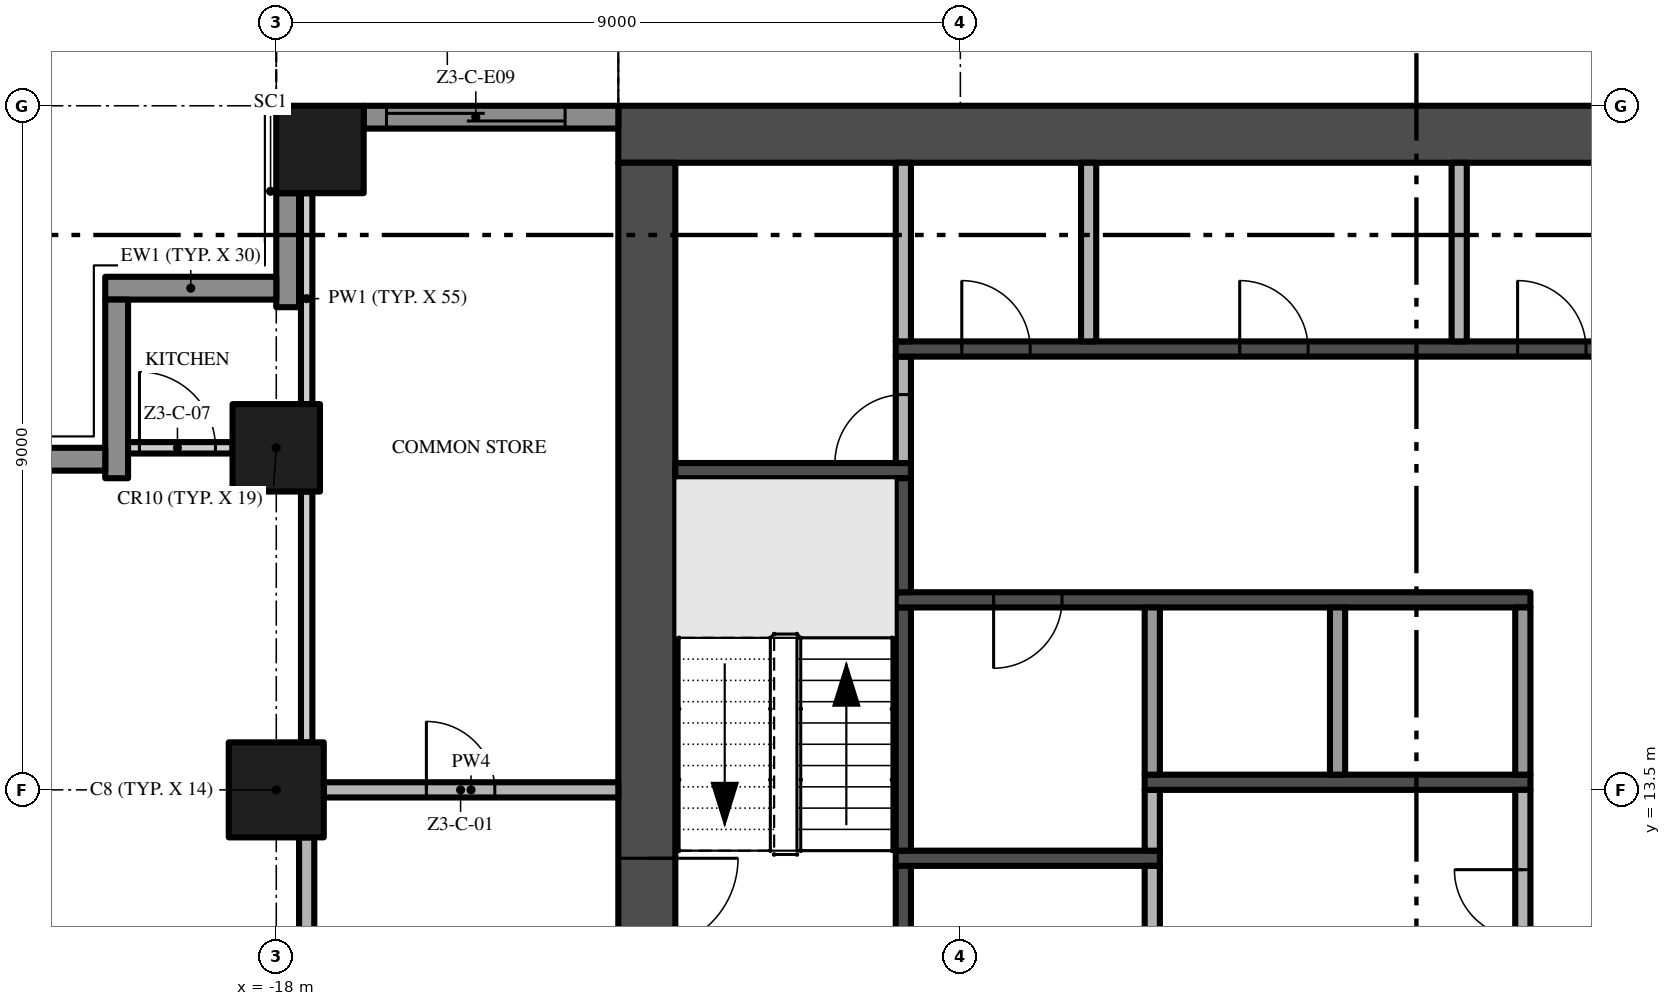
"""IFC4 building model, lengths in metres.
Left out: names, types, materials, properties, quantities, classifications, styles, units other than length and angle.
Written with IfcOpenShell. Run it as: python <this file> out.ifc"""

import sys

from ifc_helpers import new_model, si_unit, direction, frame, frame_2d, origin, origin_2d, place, context, subcontext, project, spatial, rectangle, extrude, element, fill, save


model = new_model("IFC4")
c1 = context("Model", 3, precision=1e-05, world=origin(), true_north=direction((0.0, 1.0)))
c2 = subcontext(c1, "Body", "Model", "MODEL_VIEW")
j1 = project(units=[si_unit("LENGTHUNIT", "METRE"), si_unit("PLANEANGLEUNIT", "RADIAN")], contexts=[c1])
p1 = place(None, origin())
s1 = spatial("IfcSite", under=j1, at=p1, CompositionType="ELEMENT")
p2 = place(p1, origin())
s2 = spatial("IfcBuilding", under=s1, at=p2, CompositionType="ELEMENT")
p3 = place(p2, frame((0.0, 0.0, 147.8)))
s3 = spatial("IfcBuildingStorey", under=s2, at=p3, CompositionType="ELEMENT", Elevation=147.8)
p4 = place(p3, frame((13.5, 22.125, -0.3), z_axis=(0.0, 0.0, 1.0), x_axis=(-1.0, 0.0, 0.0)))
e1 = element("IfcWall", 1, at=p4, inside=s3, PredefinedType="SHEAR", context=c2, shape_type="SweptSolid", body=[
    extrude(rectangle(XDim=27.0, YDim=0.75, at=frame_2d((13.5, 0.0))), origin(), (0.0, 0.0, 1.0), 3.8),
])
p5 = place(p3, frame((-13.125, 21.75, -0.3), z_axis=(0.0, 0.0, 1.0), x_axis=(0.0, -1.0, 0.0)))
e2 = element("IfcWall", 2, at=p5, inside=s3, PredefinedType="SHEAR", context=c2, shape_type="SweptSolid", body=[
    extrude(rectangle(XDim=16.5, YDim=0.75, at=frame_2d((8.25, 0.0))), origin(), (0.0, 0.0, 1.0), 3.8),
])
p6 = place(p5, frame((9.15, 0.0, 0.3)))
e3 = element("IfcOpeningElement", 3, at=p6, cuts=e2, PredefinedType="OPENING", context=c2, shape_type="SweptSolid", body=[
    extrude(rectangle(XDim=1.2, YDim=2.2, at=frame_2d((0.6, 1.1))), frame((0.0, 0.385, 0.0), z_axis=(0.0, -1.0, 0.0), x_axis=(1.0, 0.0, 0.0)), (0.0, 0.0, 1.0), 0.77),
])
p7 = place(p3, frame((-18.0, 13.5, 0.0), z_axis=(0.0, 0.0, 1.0), x_axis=(1.0, 0.0, 0.0)))
e4 = element("IfcColumn", 4, at=p7, inside=s3, PredefinedType="COLUMN", context=c2, shape_type="SweptSolid", body=[
    extrude(rectangle(XDim=1.25, YDim=1.25, at=origin_2d()), origin(), (0.0, 0.0, 1.0), 3.5),
])
for number, where, z_axis, x_axis in (
    (5, (-17.425, 21.925, 0.0), (0.0, 0.0, 1.0), (1.0, 0.0, 0.0)),
    (6, (-18.0, 18.0, 0.0), (0.0, 0.0, 1.0), (1.0, 0.0, 0.0)),
):
    element("IfcColumn", number, at=place(p3, frame(where, z_axis=z_axis, x_axis=x_axis)), inside=s3, PredefinedType="COLUMN", context=c2, shape_type="SweptSolid", body=[
        extrude(rectangle(XDim=1.15, YDim=1.15, at=origin_2d()), origin(), (0.0, 0.0, 1.0), 3.5),
    ])
p8 = place(p3, frame((-16.85, 22.35, 0.0), z_axis=(0.0, 0.0, 1.0), x_axis=(1.0, 0.0, 0.0)))
e7 = element("IfcWall", 7, at=p8, inside=s3, PredefinedType="SOLIDWALL", context=c2, shape_type="SweptSolid", body=[
    extrude(rectangle(XDim=3.35, YDim=0.3, at=frame_2d((1.675, 0.0))), origin(), (0.0, 0.0, 1.0), 3.5),
])
p9 = place(p8, frame((0.3, 0.0, 0.0)))
e8 = element("IfcOpeningElement", 8, at=p9, cuts=e7, PredefinedType="OPENING", context=c2, shape_type="SweptSolid", body=[
    extrude(rectangle(XDim=2.35, YDim=2.4, at=frame_2d((1.175, 1.2))), frame((0.0, 0.16, 0.0), z_axis=(0.0, -1.0, 0.0), x_axis=(1.0, 0.0, 0.0)), (0.0, 0.0, 1.0), 0.32),
])
p10 = place(p3, frame((-17.85, 19.85, 0.0), z_axis=(0.0, 0.0, 1.0), x_axis=(0.0, 1.0, 0.0)))
e9 = element("IfcWall", 9, at=p10, inside=s3, PredefinedType="SOLIDWALL", context=c2, shape_type="SweptSolid", body=[
    extrude(rectangle(XDim=1.5, YDim=0.3, at=frame_2d((0.75, 0.0))), origin(), (0.0, 0.0, 1.0), 3.5),
])
p11 = place(p3, frame((-20.25, 20.1, 0.0), z_axis=(0.0, 0.0, 1.0), x_axis=(1.0, 0.0, 0.0)))
e10 = element("IfcWall", 10, at=p11, inside=s3, PredefinedType="SOLIDWALL", context=c2, shape_type="SweptSolid", body=[
    extrude(rectangle(XDim=2.25, YDim=0.3, at=frame_2d((1.125, 0.0))), origin(), (0.0, 0.0, 1.0), 3.5),
])
p12 = place(p3, frame((-20.1, 17.6, 0.0), z_axis=(0.0, 0.0, 1.0), x_axis=(0.0, 1.0, 0.0)))
e11 = element("IfcWall", 11, at=p12, inside=s3, PredefinedType="SOLIDWALL", context=c2, shape_type="SweptSolid", body=[
    extrude(rectangle(XDim=2.35, YDim=0.3, at=frame_2d((1.175, 0.0))), origin(), (0.0, 0.0, 1.0), 3.5),
])
p13 = place(p3, frame((-22.5, 17.85, 0.0), z_axis=(0.0, 0.0, 1.0), x_axis=(1.0, 0.0, 0.0)))
e12 = element("IfcWall", 12, at=p13, inside=s3, PredefinedType="SOLIDWALL", context=c2, shape_type="SweptSolid", body=[
    extrude(rectangle(XDim=2.25, YDim=0.3, at=frame_2d((1.125, 0.0))), origin(), (0.0, 0.0, 1.0), 3.5),
])
p14 = place(p3, frame((-12.75, 17.7, 0.0), z_axis=(0.0, 0.0, 1.0), x_axis=(1.0, 0.0, 0.0)))
e13 = element("IfcWall", 13, at=p14, inside=s3, PredefinedType="SHEAR", context=c2, shape_type="SweptSolid", body=[
    extrude(rectangle(XDim=3.1, YDim=0.2, at=frame_2d((1.55, 0.0))), origin(), (0.0, 0.0, 1.0), 3.5),
])
p15 = place(p3, frame((-9.75, 10.2, 0.0), z_axis=(0.0, 0.0, 1.0), x_axis=(0.0, 1.0, 0.0)))
e14 = element("IfcWall", 14, at=p15, inside=s3, PredefinedType="SHEAR", context=c2, shape_type="SweptSolid", body=[
    extrude(rectangle(XDim=2.3, YDim=0.2, at=frame_2d((1.15, 0.0))), origin(), (0.0, 0.0, 1.0), 3.5),
])
p16 = place(p3, frame((-9.85, 12.6, 0.0), z_axis=(0.0, 0.0, 1.0), x_axis=(1.0, 0.0, 0.0)))
e15 = element("IfcWall", 15, at=p16, inside=s3, PredefinedType="SHEAR", context=c2, shape_type="SweptSolid", body=[
    extrude(rectangle(XDim=3.475, YDim=0.2, at=frame_2d((1.738, 0.0))), origin(), (0.0, 0.0, 1.0), 3.5),
])
p17 = place(p3, frame((-9.75, 12.7, 0.0), z_axis=(0.0, 0.0, 1.0), x_axis=(0.0, 1.0, 0.0)))
e16 = element("IfcWall", 16, at=p17, inside=s3, PredefinedType="SHEAR", context=c2, shape_type="SweptSolid", body=[
    extrude(rectangle(XDim=3.2, YDim=0.2, at=frame_2d((1.6, 0.0))), origin(), (0.0, 0.0, 1.0), 3.5),
])
p18 = place(p3, frame((-1.5, 16.0, 0.0), z_axis=(0.0, 0.0, 1.0), x_axis=(-1.0, 0.0, 0.0)))
e17 = element("IfcWall", 17, at=p18, inside=s3, PredefinedType="SHEAR", context=c2, shape_type="SweptSolid", body=[
    extrude(rectangle(XDim=8.35, YDim=0.2, at=frame_2d((4.175, 0.0))), origin(), (0.0, 0.0, 1.0), 3.5),
])
p19 = place(p18, frame((6.162, 0.0, 0.0)))
e18 = element("IfcOpeningElement", 18, at=p19, cuts=e17, PredefinedType="OPENING", context=c2, shape_type="SweptSolid", body=[
    extrude(rectangle(XDim=0.9, YDim=2.1, at=frame_2d((0.45, 1.05))), frame((0.0, 0.11, 0.0), z_axis=(0.0, -1.0, 0.0), x_axis=(1.0, 0.0, 0.0)), (0.0, 0.0, 1.0), 0.22),
])
p20 = place(p3, frame((-9.75, 16.1, 0.0), z_axis=(0.0, 0.0, 1.0), x_axis=(0.0, 1.0, 0.0)))
e19 = element("IfcWall", 19, at=p20, inside=s3, PredefinedType="SHEAR", context=c2, shape_type="SweptSolid", body=[
    extrude(rectangle(XDim=1.5, YDim=0.2, at=frame_2d((0.75, 0.0))), origin(), (0.0, 0.0, 1.0), 3.5),
])
p21 = place(p3, frame((-9.75, 17.8, 0.0), z_axis=(0.0, 0.0, 1.0), x_axis=(0.0, 1.0, 0.0)))
e20 = element("IfcWall", 20, at=p21, inside=s3, PredefinedType="PARTITIONING", context=c2, shape_type="SweptSolid", body=[
    extrude(rectangle(XDim=1.4, YDim=0.2, at=frame_2d((0.7, 0.0))), origin(), (0.0, 0.0, 1.0), 3.5),
])
p22 = place(p21, origin())
e21 = element("IfcOpeningElement", 21, at=p22, cuts=e20, PredefinedType="OPENING", context=c2, shape_type="SweptSolid", body=[
    extrude(rectangle(XDim=0.9, YDim=2.1, at=frame_2d((0.45, 1.05))), frame((0.0, 0.11, 0.0), z_axis=(0.0, -1.0, 0.0), x_axis=(1.0, 0.0, 0.0)), (0.0, 0.0, 1.0), 0.22),
])
p23 = place(p3, frame((-9.85, 19.3, 0.0), z_axis=(0.0, 0.0, 1.0), x_axis=(1.0, 0.0, 0.0)))
e22 = element("IfcWall", 22, at=p23, inside=s3, PredefinedType="SHEAR", context=c2, shape_type="SweptSolid", body=[
    extrude(rectangle(XDim=19.7, YDim=0.2, at=frame_2d((9.85, 0.0))), origin(), (0.0, 0.0, 1.0), 3.5),
])
p24 = place(p23, frame((10.519, 0.0, 0.0)))
e23 = element("IfcOpeningElement", 23, at=p24, cuts=e22, PredefinedType="OPENING", context=c2, shape_type="SweptSolid", body=[
    extrude(rectangle(XDim=1.1, YDim=2.1, at=frame_2d((0.55, 1.05))), frame((0.0, 0.11, 0.0), z_axis=(0.0, -1.0, 0.0), x_axis=(1.0, 0.0, 0.0)), (0.0, 0.0, 1.0), 0.22),
])
p25 = place(p23, frame((12.956, 0.0, 0.0)))
e24 = element("IfcOpeningElement", 24, at=p25, cuts=e22, PredefinedType="OPENING", context=c2, shape_type="SweptSolid", body=[
    extrude(rectangle(XDim=1.1, YDim=2.1, at=frame_2d((0.55, 1.05))), frame((0.0, 0.11, 0.0), z_axis=(0.0, -1.0, 0.0), x_axis=(1.0, 0.0, 0.0)), (0.0, 0.0, 1.0), 0.22),
])
p26 = place(p23, frame((15.394, 0.0, 0.0)))
e25 = element("IfcOpeningElement", 25, at=p26, cuts=e22, PredefinedType="OPENING", context=c2, shape_type="SweptSolid", body=[
    extrude(rectangle(XDim=1.1, YDim=2.1, at=frame_2d((0.55, 1.05))), frame((0.0, 0.11, 0.0), z_axis=(0.0, -1.0, 0.0), x_axis=(1.0, 0.0, 0.0)), (0.0, 0.0, 1.0), 0.22),
])
p27 = place(p23, frame((17.831, 0.0, 0.0)))
e26 = element("IfcOpeningElement", 26, at=p27, cuts=e22, PredefinedType="OPENING", context=c2, shape_type="SweptSolid", body=[
    extrude(rectangle(XDim=1.1, YDim=2.1, at=frame_2d((0.55, 1.05))), frame((0.0, 0.11, 0.0), z_axis=(0.0, -1.0, 0.0), x_axis=(1.0, 0.0, 0.0)), (0.0, 0.0, 1.0), 0.22),
])
p28 = place(p23, frame((0.869, 0.0, 0.0)))
e27 = element("IfcOpeningElement", 27, at=p28, cuts=e22, PredefinedType="OPENING", context=c2, shape_type="SweptSolid", body=[
    extrude(rectangle(XDim=0.9, YDim=2.1, at=frame_2d((0.45, 1.05))), frame((0.0, 0.11, 0.0), z_axis=(0.0, -1.0, 0.0), x_axis=(1.0, 0.0, 0.0)), (0.0, 0.0, 1.0), 0.22),
])
p29 = place(p23, frame((4.525, 0.0, 0.0)))
e28 = element("IfcOpeningElement", 28, at=p29, cuts=e22, PredefinedType="OPENING", context=c2, shape_type="SweptSolid", body=[
    extrude(rectangle(XDim=0.9, YDim=2.1, at=frame_2d((0.45, 1.05))), frame((0.0, 0.11, 0.0), z_axis=(0.0, -1.0, 0.0), x_axis=(1.0, 0.0, 0.0)), (0.0, 0.0, 1.0), 0.22),
])
p30 = place(p23, frame((8.181, 0.0, 0.0)))
e29 = element("IfcOpeningElement", 29, at=p30, cuts=e22, PredefinedType="OPENING", context=c2, shape_type="SweptSolid", body=[
    extrude(rectangle(XDim=0.9, YDim=2.1, at=frame_2d((0.45, 1.05))), frame((0.0, 0.11, 0.0), z_axis=(0.0, -1.0, 0.0), x_axis=(1.0, 0.0, 0.0)), (0.0, 0.0, 1.0), 0.22),
])
for number, where, z_axis, x_axis in (
    (30, (-9.75, 19.4, 0.0), (0.0, 0.0, 1.0), (0.0, 1.0, 0.0)),
    (31, (-7.312, 19.4, 0.0), (0.0, 0.0, 1.0), (0.0, 1.0, 0.0)),
):
    element("IfcWall", number, at=place(p3, frame(where, z_axis=z_axis, x_axis=x_axis)), inside=s3, PredefinedType="PARTITIONING", context=c2, shape_type="SweptSolid", body=[
        extrude(rectangle(XDim=2.35, YDim=0.2, at=frame_2d((1.175, 0.0))), origin(), (0.0, 0.0, 1.0), 3.5),
    ])
p31 = place(p3, frame((-6.475, 10.5, 0.0), z_axis=(0.0, 0.0, 1.0), x_axis=(0.0, 1.0, 0.0)))
e32 = element("IfcWall", 32, at=p31, inside=s3, PredefinedType="PARTITIONING", context=c2, shape_type="SweptSolid", body=[
    extrude(rectangle(XDim=2.0, YDim=0.2, at=frame_2d((1.0, 0.0))), origin(), (0.0, 0.0, 1.0), 3.5),
])
p32 = place(p3, frame((-6.475, 12.7, 0.0), z_axis=(0.0, 0.0, 1.0), x_axis=(0.0, 1.0, 0.0)))
e33 = element("IfcWall", 33, at=p32, inside=s3, PredefinedType="PARTITIONING", context=c2, shape_type="SweptSolid", body=[
    extrude(rectangle(XDim=0.8, YDim=0.2, at=frame_2d((0.4, 0.0))), origin(), (0.0, 0.0, 1.0), 3.5),
])
p33 = place(p3, frame((-6.575, 13.6, 0.0), z_axis=(0.0, 0.0, 1.0), x_axis=(1.0, 0.0, 0.0)))
e34 = element("IfcWall", 34, at=p33, inside=s3, PredefinedType="SHEAR", context=c2, shape_type="SweptSolid", body=[
    extrude(rectangle(XDim=5.075, YDim=0.2, at=frame_2d((2.538, 0.0))), origin(), (0.0, 0.0, 1.0), 3.5),
])
for number, where, z_axis, x_axis in (
    (35, (-6.475, 13.7, 0.0), (0.0, 0.0, 1.0), (0.0, 1.0, 0.0)),
    (36, (-4.037, 13.7, 0.0), (0.0, 0.0, 1.0), (0.0, 1.0, 0.0)),
):
    element("IfcWall", number, at=place(p3, frame(where, z_axis=z_axis, x_axis=x_axis)), inside=s3, PredefinedType="PARTITIONING", context=c2, shape_type="SweptSolid", body=[
        extrude(rectangle(XDim=2.2, YDim=0.2, at=frame_2d((1.1, 0.0))), origin(), (0.0, 0.0, 1.0), 3.5),
    ])
p34 = place(p3, frame((-2.438, 19.4, 0.0), z_axis=(0.0, 0.0, 1.0), x_axis=(0.0, 1.0, 0.0)))
e37 = element("IfcWall", 37, at=p34, inside=s3, PredefinedType="PARTITIONING", context=c2, shape_type="SweptSolid", body=[
    extrude(rectangle(XDim=2.35, YDim=0.2, at=frame_2d((1.175, 0.0))), origin(), (0.0, 0.0, 1.0), 3.5),
])
p35 = place(p3, frame((-1.6, 10.5, 0.0), z_axis=(0.0, 0.0, 1.0), x_axis=(0.0, 1.0, 0.0)))
e38 = element("IfcWall", 38, at=p35, inside=s3, PredefinedType="PARTITIONING", context=c2, shape_type="SweptSolid", body=[
    extrude(rectangle(XDim=3.0, YDim=0.2, at=frame_2d((1.5, 0.0))), origin(), (0.0, 0.0, 1.0), 3.5),
])
p36 = place(p35, frame((1.05, 0.0, 0.0)))
e39 = element("IfcOpeningElement", 39, at=p36, cuts=e38, PredefinedType="OPENING", context=c2, shape_type="SweptSolid", body=[
    extrude(rectangle(XDim=0.9, YDim=2.1, at=frame_2d((0.45, 1.05))), frame((0.0, 0.11, 0.0), z_axis=(0.0, -1.0, 0.0), x_axis=(1.0, 0.0, 0.0)), (0.0, 0.0, 1.0), 0.22),
])
p37 = place(p3, frame((-1.6, 13.7, 0.0), z_axis=(0.0, 0.0, 1.0), x_axis=(0.0, 1.0, 0.0)))
e40 = element("IfcWall", 40, at=p37, inside=s3, PredefinedType="PARTITIONING", context=c2, shape_type="SweptSolid", body=[
    extrude(rectangle(XDim=2.2, YDim=0.2, at=frame_2d((1.1, 0.0))), origin(), (0.0, 0.0, 1.0), 3.5),
])
p38 = place(p3, frame((-17.375, 13.5, 0.0), z_axis=(0.0, 0.0, 1.0), x_axis=(1.0, 0.0, 0.0)))
e41 = element("IfcWall", 41, at=p38, inside=s3, PredefinedType="PARTITIONING", context=c2, shape_type="SweptSolid", body=[
    extrude(rectangle(XDim=3.875, YDim=0.2, at=frame_2d((1.938, 0.0))), origin(), (0.0, 0.0, 1.0), 3.5),
])
p39 = place(p38, frame((1.35, 0.0, 0.0)))
e42 = element("IfcOpeningElement", 42, at=p39, cuts=e41, PredefinedType="OPENING", context=c2, shape_type="SweptSolid", body=[
    extrude(rectangle(XDim=0.9, YDim=2.1, at=frame_2d((0.45, 1.05))), frame((0.0, 0.11, 0.0), z_axis=(0.0, -1.0, 0.0), x_axis=(1.0, 0.0, 0.0)), (0.0, 0.0, 1.0), 0.22),
])
p40 = place(p3, frame((-19.95, 18.0, 0.0), z_axis=(0.0, 0.0, 1.0), x_axis=(1.0, 0.0, 0.0)))
e43 = element("IfcWall", 43, at=p40, inside=s3, PredefinedType="PARTITIONING", context=c2, shape_type="SweptSolid", body=[
    extrude(rectangle(XDim=1.375, YDim=0.15, at=frame_2d((0.688, 0.0))), origin(), (0.0, 0.0, 1.0), 3.5),
])
p41 = place(p40, frame((0.15, 0.0, 0.0)))
e44 = element("IfcOpeningElement", 44, at=p41, cuts=e43, PredefinedType="OPENING", context=c2, shape_type="SweptSolid", body=[
    extrude(rectangle(XDim=1.0, YDim=2.4, at=frame_2d((0.5, 1.2))), frame((0.0, 0.085, 0.0), z_axis=(0.0, -1.0, 0.0), x_axis=(1.0, 0.0, 0.0)), (0.0, 0.0, 1.0), 0.17),
])
p42 = place(p3, frame((-17.6, 5.125, 0.0), z_axis=(0.0, 0.0, 1.0), x_axis=(0.0, 1.0, 0.0)))
e45 = element("IfcWall", 45, at=p42, inside=s3, PredefinedType="PARTITIONING", context=c2, shape_type="SweptSolid", body=[
    extrude(rectangle(XDim=7.75, YDim=0.2, at=frame_2d((3.875, 0.0))), origin(), (0.0, 0.0, 1.0), 3.5),
])
p43 = place(p42, frame((1.0, 0.0, 0.0)))
e46 = element("IfcOpeningElement", 46, at=p43, cuts=e45, PredefinedType="OPENING", context=c2, shape_type="SweptSolid", body=[
    extrude(rectangle(XDim=1.2, YDim=2.4, at=frame_2d((0.6, 1.2))), frame((0.0, 0.11, 0.0), z_axis=(0.0, -1.0, 0.0), x_axis=(1.0, 0.0, 0.0)), (0.0, 0.0, 1.0), 0.22),
])
p44 = place(p3, frame((-17.6, 14.125, 0.0), z_axis=(0.0, 0.0, 1.0), x_axis=(0.0, 1.0, 0.0)))
e47 = element("IfcWall", 47, at=p44, inside=s3, PredefinedType="PARTITIONING", context=c2, shape_type="SweptSolid", body=[
    extrude(rectangle(XDim=3.3, YDim=0.15, at=frame_2d((1.65, 0.0))), origin(), (0.0, 0.0, 1.0), 3.5),
])
p45 = place(p3, frame((-17.6, 18.575, 0.0), z_axis=(0.0, 0.0, 1.0), x_axis=(0.0, 1.0, 0.0)))
e48 = element("IfcWall", 48, at=p45, inside=s3, PredefinedType="PARTITIONING", context=c2, shape_type="SweptSolid", body=[
    extrude(rectangle(XDim=2.775, YDim=0.15, at=frame_2d((1.387, 0.0))), origin(), (0.0, 0.0, 1.0), 3.5),
])
p46 = place(p9, origin())
e49 = element("IfcDoor", 49, at=p46, inside=s3, OperationType="SINGLE_SWING_LEFT", PredefinedType="DOOR", context=c2, shape_type="SweptSolid", body=[
    extrude(rectangle(XDim=2.35, YDim=2.4, at=frame_2d((1.175, 1.2))), frame((0.0, 0.025, 0.0), z_axis=(0.0, -1.0, 0.0), x_axis=(1.0, 0.0, 0.0)), (0.0, 0.0, 1.0), 0.05),
])
fill(e8, e49)
p47 = place(p6, frame((1.2, 0.0, 0.0), z_axis=(0.0, 0.0, 1.0), x_axis=(-1.0, 0.0, 0.0)))
e50 = element("IfcDoor", 50, at=p47, inside=s3, OperationType="SINGLE_SWING_RIGHT", PredefinedType="DOOR", context=c2, shape_type="SweptSolid", body=[
    extrude(rectangle(XDim=1.2, YDim=2.2, at=frame_2d((0.6, 1.1))), frame((0.0, 0.025, 0.0), z_axis=(0.0, -1.0, 0.0), x_axis=(1.0, 0.0, 0.0)), (0.0, 0.0, 1.0), 0.05),
])
fill(e3, e50)
p48 = place(p19, origin())
e51 = element("IfcDoor", 51, at=p48, inside=s3, OperationType="SINGLE_SWING_RIGHT", PredefinedType="DOOR", context=c2, shape_type="SweptSolid", body=[
    extrude(rectangle(XDim=0.9, YDim=2.1, at=frame_2d((0.45, 1.05))), frame((0.0, 0.025, 0.0), z_axis=(0.0, -1.0, 0.0), x_axis=(1.0, 0.0, 0.0)), (0.0, 0.0, 1.0), 0.05),
])
fill(e18, e51)
p49 = place(p36, origin())
e52 = element("IfcDoor", 52, at=p49, inside=s3, OperationType="SINGLE_SWING_RIGHT", PredefinedType="DOOR", context=c2, shape_type="SweptSolid", body=[
    extrude(rectangle(XDim=0.9, YDim=2.1, at=frame_2d((0.45, 1.05))), frame((0.0, 0.025, 0.0), z_axis=(0.0, -1.0, 0.0), x_axis=(1.0, 0.0, 0.0)), (0.0, 0.0, 1.0), 0.05),
])
fill(e39, e52)
p50 = place(p22, origin())
e53 = element("IfcDoor", 53, at=p50, inside=s3, OperationType="SINGLE_SWING_LEFT", PredefinedType="DOOR", context=c2, shape_type="SweptSolid", body=[
    extrude(rectangle(XDim=0.9, YDim=2.1, at=frame_2d((0.45, 1.05))), frame((0.0, 0.025, 0.0), z_axis=(0.0, -1.0, 0.0), x_axis=(1.0, 0.0, 0.0)), (0.0, 0.0, 1.0), 0.05),
])
fill(e21, e53)
p51 = place(p28, origin())
e54 = element("IfcDoor", 54, at=p51, inside=s3, OperationType="SINGLE_SWING_LEFT", PredefinedType="DOOR", context=c2, shape_type="SweptSolid", body=[
    extrude(rectangle(XDim=0.9, YDim=2.1, at=frame_2d((0.45, 1.05))), frame((0.0, 0.025, 0.0), z_axis=(0.0, -1.0, 0.0), x_axis=(1.0, 0.0, 0.0)), (0.0, 0.0, 1.0), 0.05),
])
fill(e27, e54)
p52 = place(p29, origin())
e55 = element("IfcDoor", 55, at=p52, inside=s3, OperationType="SINGLE_SWING_LEFT", PredefinedType="DOOR", context=c2, shape_type="SweptSolid", body=[
    extrude(rectangle(XDim=0.9, YDim=2.1, at=frame_2d((0.45, 1.05))), frame((0.0, 0.025, 0.0), z_axis=(0.0, -1.0, 0.0), x_axis=(1.0, 0.0, 0.0)), (0.0, 0.0, 1.0), 0.05),
])
fill(e28, e55)
p53 = place(p30, origin())
e56 = element("IfcDoor", 56, at=p53, inside=s3, OperationType="SINGLE_SWING_LEFT", PredefinedType="DOOR", context=c2, shape_type="SweptSolid", body=[
    extrude(rectangle(XDim=0.9, YDim=2.1, at=frame_2d((0.45, 1.05))), frame((0.0, 0.025, 0.0), z_axis=(0.0, -1.0, 0.0), x_axis=(1.0, 0.0, 0.0)), (0.0, 0.0, 1.0), 0.05),
])
fill(e29, e56)
p54 = place(p39, origin())
e57 = element("IfcDoor", 57, at=p54, inside=s3, OperationType="SINGLE_SWING_LEFT", PredefinedType="DOOR", context=c2, shape_type="SweptSolid", body=[
    extrude(rectangle(XDim=0.9, YDim=2.1, at=frame_2d((0.45, 1.05))), frame((0.0, 0.025, 0.0), z_axis=(0.0, -1.0, 0.0), x_axis=(1.0, 0.0, 0.0)), (0.0, 0.0, 1.0), 0.05),
])
fill(e42, e57)
p55 = place(p41, origin())
e58 = element("IfcDoor", 58, at=p55, inside=s3, OperationType="SINGLE_SWING_LEFT", PredefinedType="DOOR", context=c2, shape_type="SweptSolid", body=[
    extrude(rectangle(XDim=1.0, YDim=2.4, at=frame_2d((0.5, 1.2))), frame((0.0, 0.025, 0.0), z_axis=(0.0, -1.0, 0.0), x_axis=(1.0, 0.0, 0.0)), (0.0, 0.0, 1.0), 0.05),
])
fill(e44, e58)
save(model, sys.argv[1])
